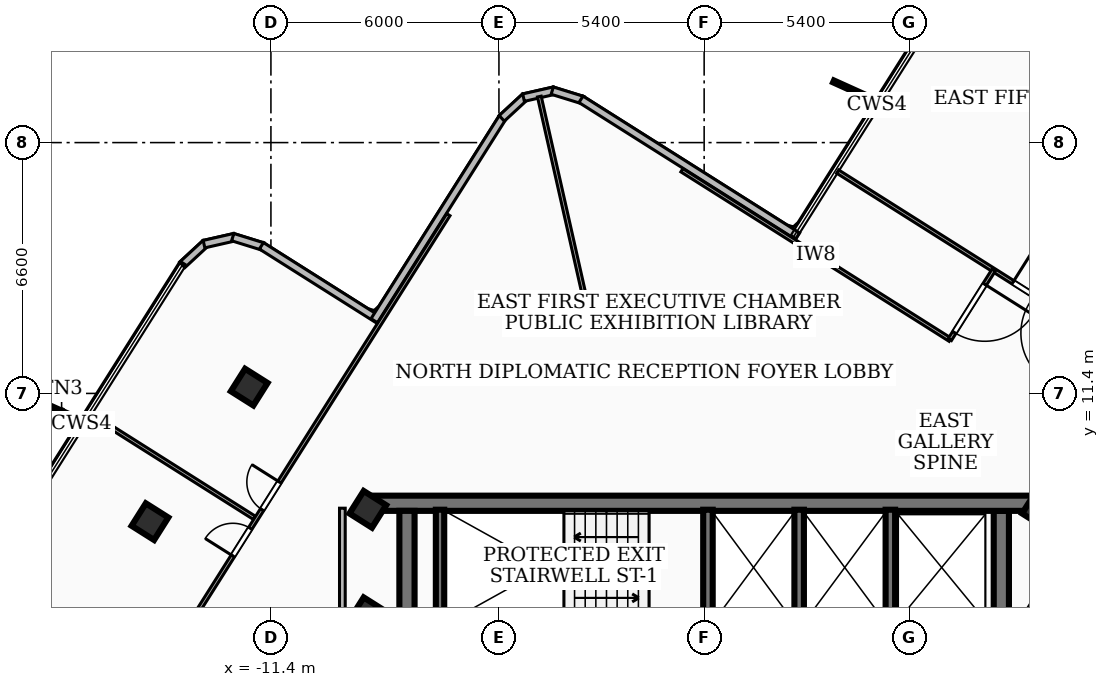
"""IFC4 building model, lengths in metres.
Left out: names, types, materials, properties, quantities, classifications, styles, units other than length and angle.
Written with IfcOpenShell. Run it as: python <this file> out.ifc"""

import sys

from ifc_helpers import new_model, si_unit, direction, frame, frame_2d, origin, origin_2d, place, context, subcontext, project, spatial, rectangle, extrude, element, fill, save


model = new_model("IFC4")
c1 = context("Model", 3, precision=1e-05, world=origin(), true_north=direction((0.0, 1.0)))
c2 = subcontext(c1, "Body", "Model", "MODEL_VIEW")
j1 = project(units=[si_unit("LENGTHUNIT", "METRE"), si_unit("PLANEANGLEUNIT", "RADIAN")], contexts=[c1])
p1 = place(None, origin())
s1 = spatial("IfcSite", under=j1, at=p1, CompositionType="ELEMENT")
p2 = place(p1, origin())
s2 = spatial("IfcBuilding", under=s1, at=p2, CompositionType="ELEMENT")
p3 = place(p2, frame((0.0, 0.0, 274.86)))
s3 = spatial("IfcBuildingStorey", under=s2, at=p3, CompositionType="ELEMENT", Elevation=274.86)
p4 = place(p3, frame((-8.78, 8.51, 0.0), z_axis=(0.0, 0.0, 1.0), x_axis=(1.0, 0.0, 0.0)))
e1 = element("IfcWall", 1, at=p4, inside=s3, PredefinedType="SHEAR", context=c2, shape_type="SweptSolid", body=[
    extrude(rectangle(XDim=17.56, YDim=0.4, at=frame_2d((8.78, 0.0))), origin(), (0.0, 0.0, 1.0), 3.16),
])
for number, where, z_axis, x_axis in (
    (2, (-7.82, 1.95, 0.0), (0.0, 0.0, 1.0), (0.0, 1.0, 0.0)),
    (3, (7.82, 8.31, 0.0), (0.0, 0.0, 1.0), (0.0, -1.0, 0.0)),
):
    element("IfcWall", number, at=place(p3, frame(where, z_axis=z_axis, x_axis=x_axis)), inside=s3, PredefinedType="SHEAR", context=c2, shape_type="SweptSolid", body=[
        extrude(rectangle(XDim=6.36, YDim=0.4, at=frame_2d((3.18, 0.0))), origin(), (0.0, 0.0, 1.0), 3.16),
    ])
p5 = place(p3, frame((-6.95, 5.28, 0.0), z_axis=(0.0, 0.0, 1.0), x_axis=(0.0, 1.0, 0.0)))
e4 = element("IfcWall", 4, at=p5, inside=s3, PredefinedType="SOLIDWALL", context=c2, shape_type="SweptSolid", body=[
    extrude(rectangle(XDim=3.06, YDim=0.22, at=frame_2d((1.53, 0.0))), origin(), (0.0, 0.0, 1.0), 3.16),
])
for number, where, z_axis, x_axis in (
    (5, (0.1, 5.3, 0.0), (0.0, 0.0, 1.0), (0.0, 1.0, 0.0)),
    (6, (2.5, 5.3, 0.0), (0.0, 0.0, 1.0), (0.0, 1.0, 0.0)),
    (7, (4.9, 5.3, 0.0), (0.0, 0.0, 1.0), (0.0, 1.0, 0.0)),
):
    element("IfcWall", number, at=place(p3, frame(where, z_axis=z_axis, x_axis=x_axis)), inside=s3, PredefinedType="SOLIDWALL", context=c2, shape_type="SweptSolid", body=[
        extrude(rectangle(XDim=3.04, YDim=0.25, at=frame_2d((1.52, 0.0))), origin(), (0.0, 0.0, 1.0), 3.16),
    ])
for number, where, z_axis, x_axis in (
    (8, (-8.85, 5.55, 0.0), (0.0, 0.0, 1.0), (0.534, 0.845, 0.0)),
    (9, (8.85, 5.55, 0.0), (0.0, 0.0, 1.0), (0.534, 0.845, 0.0)),
    (10, (-8.85, 8.35, 0.0), (0.0, 0.0, 1.0), (0.534, 0.845, 0.0)),
    (11, (8.85, 8.35, 0.0), (0.0, 0.0, 1.0), (0.534, 0.845, 0.0)),
    (12, (-11.971, 11.566, 0.0), (0.0, 0.0, 1.0), (0.534, 0.845, 0.0)),
    (13, (-14.583, 8.026, 0.0), (0.0, 0.0, 1.0), (0.534, 0.845, 0.0)),
):
    element("IfcColumn", number, at=place(p3, frame(where, z_axis=z_axis, x_axis=x_axis)), inside=s3, PredefinedType="COLUMN", context=c2, shape_type="SweptSolid", body=[
        extrude(rectangle(XDim=0.7, YDim=0.7, at=origin_2d()), origin(), (0.0, 0.0, 1.0), 3.42),
    ])
p6 = place(p3, frame((-13.734, 14.782, 0.0), z_axis=(0.0, 0.0, 1.0), x_axis=(0.73396507435, 0.679187212508, 0.0)))
e14 = element("IfcWall", 14, at=p6, inside=s3, PredefinedType="SOLIDWALL", context=c2, shape_type="SweptSolid", body=[
    extrude(rectangle(XDim=0.838, YDim=0.2, at=frame_2d((0.419, 0.0))), origin(), (0.0, 0.0, 1.0), 3.16),
])
p7 = place(p3, frame((-13.161, 15.328, 0.0), z_axis=(0.0, 0.0, 1.0), x_axis=(0.975030953114, 0.222068999343, 0.0)))
e15 = element("IfcWall", 15, at=p7, inside=s3, PredefinedType="SOLIDWALL", context=c2, shape_type="SweptSolid", body=[
    extrude(rectangle(XDim=0.824, YDim=0.2, at=frame_2d((0.412, 0.0))), origin(), (0.0, 0.0, 1.0), 3.16),
])
p8 = place(p3, frame((-12.405, 15.512, 0.0), z_axis=(0.0, 0.0, 1.0), x_axis=(0.95514660916, -0.296133339917, 0.0)))
e16 = element("IfcWall", 16, at=p8, inside=s3, PredefinedType="SOLIDWALL", context=c2, shape_type="SweptSolid", body=[
    extrude(rectangle(XDim=0.838, YDim=0.2, at=frame_2d((0.419, 0.0))), origin(), (0.0, 0.0, 1.0), 3.16),
])
p9 = place(p3, frame((-11.65, 15.284, 0.0), z_axis=(0.0, 0.0, 1.0), x_axis=(0.84553031048, -0.533927423962, 0.0)))
e17 = element("IfcWall", 17, at=p9, inside=s3, PredefinedType="SOLIDWALL", context=c2, shape_type="SweptSolid", body=[
    extrude(rectangle(XDim=3.643, YDim=0.2, at=frame_2d((1.821, 0.0))), origin(), (0.0, 0.0, 1.0), 3.16),
])
p10 = place(p3, frame((-8.681, 13.314, 0.0), z_axis=(0.0, 0.0, 1.0), x_axis=(0.533927810135, 0.845530066623, 0.0)))
e18 = element("IfcWall", 18, at=p10, inside=s3, PredefinedType="SOLIDWALL", context=c2, shape_type="SweptSolid", body=[
    extrude(rectangle(XDim=6.342, YDim=0.2, at=frame_2d((3.171, 0.0))), origin(), (0.0, 0.0, 1.0), 3.16),
])
p11 = place(p3, frame((-5.326, 18.638, 0.0), z_axis=(0.0, 0.0, 1.0), x_axis=(0.734546260064, 0.678558613405, 0.0)))
e19 = element("IfcWall", 19, at=p11, inside=s3, PredefinedType="SOLIDWALL", context=c2, shape_type="SweptSolid", body=[
    extrude(rectangle(XDim=0.837, YDim=0.2, at=frame_2d((0.418, 0.0))), origin(), (0.0, 0.0, 1.0), 3.16),
])
p12 = place(p3, frame((-4.753, 19.183, 0.0), z_axis=(0.0, 0.0, 1.0), x_axis=(0.975095027757, 0.22178748126, 0.0)))
e20 = element("IfcWall", 20, at=p12, inside=s3, PredefinedType="SOLIDWALL", context=c2, shape_type="SweptSolid", body=[
    extrude(rectangle(XDim=0.824, YDim=0.2, at=frame_2d((0.412, 0.0))), origin(), (0.0, 0.0, 1.0), 3.16),
])
p13 = place(p3, frame((-3.997, 19.367, 0.0), z_axis=(0.0, 0.0, 1.0), x_axis=(0.955248680357, -0.295803919306, 0.0)))
e21 = element("IfcWall", 21, at=p13, inside=s3, PredefinedType="SOLIDWALL", context=c2, shape_type="SweptSolid", body=[
    extrude(rectangle(XDim=0.839, YDim=0.2, at=frame_2d((0.419, 0.0))), origin(), (0.0, 0.0, 1.0), 3.16),
])
p14 = place(p3, frame((-3.241, 19.139, 0.0), z_axis=(0.0, 0.0, 1.0), x_axis=(0.845431246435, -0.534084270085, 0.0)))
e22 = element("IfcWall", 22, at=p14, inside=s3, PredefinedType="SOLIDWALL", context=c2, shape_type="SweptSolid", body=[
    extrude(rectangle(XDim=6.742, YDim=0.2, at=frame_2d((3.371, 0.0))), origin(), (0.0, 0.0, 1.0), 3.16),
])
p15 = place(p3, frame((-9.52, 1.75, 0.0), z_axis=(0.0, 0.0, 1.0), x_axis=(0.0, 1.0, 0.0)))
e23 = element("IfcWall", 23, at=p15, inside=s3, PredefinedType="PARTITIONING", context=c2, shape_type="SweptSolid", body=[
    extrude(rectangle(XDim=6.63, YDim=0.15, at=frame_2d((3.315, 0.0))), origin(), (0.0, 0.0, 1.0), 2.53),
])
p16 = place(p3, frame((-3.056, 13.54, 0.0), z_axis=(0.0, 0.0, 1.0), x_axis=(-0.22033949405, 0.975423245244, 0.0)))
e24 = element("IfcWall", 24, at=p16, inside=s3, PredefinedType="PARTITIONING", context=c2, shape_type="SweptSolid", body=[
    extrude(rectangle(XDim=5.814, YDim=0.1, at=frame_2d((2.907, 0.0))), origin(), (0.0, 0.0, 1.0), 3.16),
])
p17 = place(p3, frame((6.473, 12.813, 0.0), z_axis=(0.0, 0.0, 1.0), x_axis=(-0.845447210208, 0.534058999317, 0.0)))
e25 = element("IfcWall", 25, at=p17, inside=s3, PredefinedType="PARTITIONING", context=c2, shape_type="SweptSolid", body=[
    extrude(rectangle(XDim=8.349, YDim=0.1, at=frame_2d((4.175, 0.0))), origin(), (0.0, 0.0, 1.0), 3.16),
])
p18 = place(p3, frame((7.619, 14.645, 0.0), z_axis=(0.0, 0.0, 1.0), x_axis=(-0.533984489243, -0.845494272747, 0.0)))
e26 = element("IfcWall", 26, at=p18, inside=s3, PredefinedType="PARTITIONING", context=c2, shape_type="SweptSolid", body=[
    extrude(rectangle(XDim=2.161, YDim=0.1, at=frame_2d((1.08, 0.0))), origin(), (0.0, 0.0, 1.0), 3.16),
])
p19 = place(p18, frame((0.441, 0.0, 0.0)))
e27 = element("IfcOpeningElement", 27, at=p19, cuts=e26, PredefinedType="OPENING", context=c2, shape_type="SweptSolid", body=[
    extrude(rectangle(XDim=1.5, YDim=2.12, at=frame_2d((0.75, 1.06))), frame((0.0, 0.06, 0.0), z_axis=(0.0, -1.0, 0.0), x_axis=(1.0, 0.0, 0.0)), (0.0, 0.0, 1.0), 0.12),
])
p20 = place(p3, frame((3.514, 17.237, 0.0), z_axis=(0.0, 0.0, 1.0), x_axis=(0.845461855996, -0.534035813458, 0.0)))
e28 = element("IfcWall", 28, at=p20, inside=s3, PredefinedType="PARTITIONING", context=c2, shape_type="SweptSolid", body=[
    extrude(rectangle(XDim=12.87, YDim=0.1, at=frame_2d((6.435, 0.0))), origin(), (0.0, 0.0, 1.0), 2.53),
])
p21 = place(p20, frame((6.655, 0.0, 0.0)))
e29 = element("IfcOpeningElement", 29, at=p21, cuts=e28, PredefinedType="OPENING", context=c2, shape_type="SweptSolid", body=[
    extrude(rectangle(XDim=0.86, YDim=2.04, at=frame_2d((0.43, 1.02))), frame((0.0, 0.06, 0.0), z_axis=(0.0, -1.0, 0.0), x_axis=(1.0, 0.0, 0.0)), (0.0, 0.0, 1.0), 0.12),
])
p22 = place(p20, frame((5.454, 0.0, 0.0)))
e30 = element("IfcOpeningElement", 30, at=p22, cuts=e28, PredefinedType="OPENING", context=c2, shape_type="SweptSolid", body=[
    extrude(rectangle(XDim=0.86, YDim=2.04, at=frame_2d((0.43, 1.02))), frame((0.0, 0.06, 0.0), z_axis=(0.0, -1.0, 0.0), x_axis=(1.0, 0.0, 0.0)), (0.0, 0.0, 1.0), 0.12),
])
p23 = place(p3, frame((-11.838, 8.129, 0.0), z_axis=(0.0, 0.0, 1.0), x_axis=(-0.845412458252, 0.53411400977, 0.0)))
e31 = element("IfcWall", 31, at=p23, inside=s3, PredefinedType="PARTITIONING", context=c2, shape_type="SweptSolid", body=[
    extrude(rectangle(XDim=5.085, YDim=0.1, at=frame_2d((2.542, 0.0))), origin(), (0.0, 0.0, 1.0), 2.53),
])
p24 = place(p3, frame((-17.646, -1.178, 0.0), z_axis=(0.0, 0.0, 1.0), x_axis=(0.534052309352, 0.845451436143, 0.0)))
e32 = element("IfcWall", 32, at=p24, inside=s3, PredefinedType="PARTITIONING", context=c2, shape_type="SweptSolid", body=[
    extrude(rectangle(XDim=20.44, YDim=0.1, at=frame_2d((10.22, 0.0))), origin(), (0.0, 0.0, 1.0), 2.53),
])
p25 = place(p24, frame((11.259, 0.0, 0.0)))
e33 = element("IfcOpeningElement", 33, at=p25, cuts=e32, PredefinedType="OPENING", context=c2, shape_type="SweptSolid", body=[
    extrude(rectangle(XDim=0.86, YDim=2.04, at=frame_2d((0.43, 1.02))), frame((0.0, 0.06, 0.0), z_axis=(0.0, -1.0, 0.0), x_axis=(1.0, 0.0, 0.0)), (0.0, 0.0, 1.0), 0.12),
])
p26 = place(p24, frame((9.819, 0.0, 0.0)))
e34 = element("IfcOpeningElement", 34, at=p26, cuts=e32, PredefinedType="OPENING", context=c2, shape_type="SweptSolid", body=[
    extrude(rectangle(XDim=0.86, YDim=2.04, at=frame_2d((0.43, 1.02))), frame((0.0, 0.06, 0.0), z_axis=(0.0, -1.0, 0.0), x_axis=(1.0, 0.0, 0.0)), (0.0, 0.0, 1.0), 0.12),
])
p27 = place(p19, origin())
e35 = element("IfcDoor", 35, at=p27, inside=s3, OperationType="SINGLE_SWING_LEFT", PredefinedType="DOOR", context=c2, shape_type="SweptSolid", body=[
    extrude(rectangle(XDim=1.5, YDim=2.12, at=frame_2d((0.75, 1.06))), frame((0.0, 0.025, 0.0), z_axis=(0.0, -1.0, 0.0), x_axis=(1.0, 0.0, 0.0)), (0.0, 0.0, 1.0), 0.05),
])
fill(e27, e35)
p28 = place(p22, origin())
e36 = element("IfcDoor", 36, at=p28, inside=s3, OperationType="SINGLE_SWING_LEFT", PredefinedType="DOOR", context=c2, shape_type="SweptSolid", body=[
    extrude(rectangle(XDim=0.86, YDim=2.04, at=frame_2d((0.43, 1.02))), frame((0.0, 0.025, 0.0), z_axis=(0.0, -1.0, 0.0), x_axis=(1.0, 0.0, 0.0)), (0.0, 0.0, 1.0), 0.05),
])
fill(e30, e36)
p29 = place(p25, origin())
e37 = element("IfcDoor", 37, at=p29, inside=s3, OperationType="SINGLE_SWING_RIGHT", PredefinedType="DOOR", context=c2, shape_type="SweptSolid", body=[
    extrude(rectangle(XDim=0.86, YDim=2.04, at=frame_2d((0.43, 1.02))), frame((0.0, 0.025, 0.0), z_axis=(0.0, -1.0, 0.0), x_axis=(1.0, 0.0, 0.0)), (0.0, 0.0, 1.0), 0.05),
])
fill(e33, e37)
p30 = place(p26, origin())
e38 = element("IfcDoor", 38, at=p30, inside=s3, OperationType="SINGLE_SWING_LEFT", PredefinedType="DOOR", context=c2, shape_type="SweptSolid", body=[
    extrude(rectangle(XDim=0.86, YDim=2.04, at=frame_2d((0.43, 1.02))), frame((0.0, 0.025, 0.0), z_axis=(0.0, -1.0, 0.0), x_axis=(1.0, 0.0, 0.0)), (0.0, 0.0, 1.0), 0.05),
])
fill(e34, e38)
save(model, sys.argv[1])
